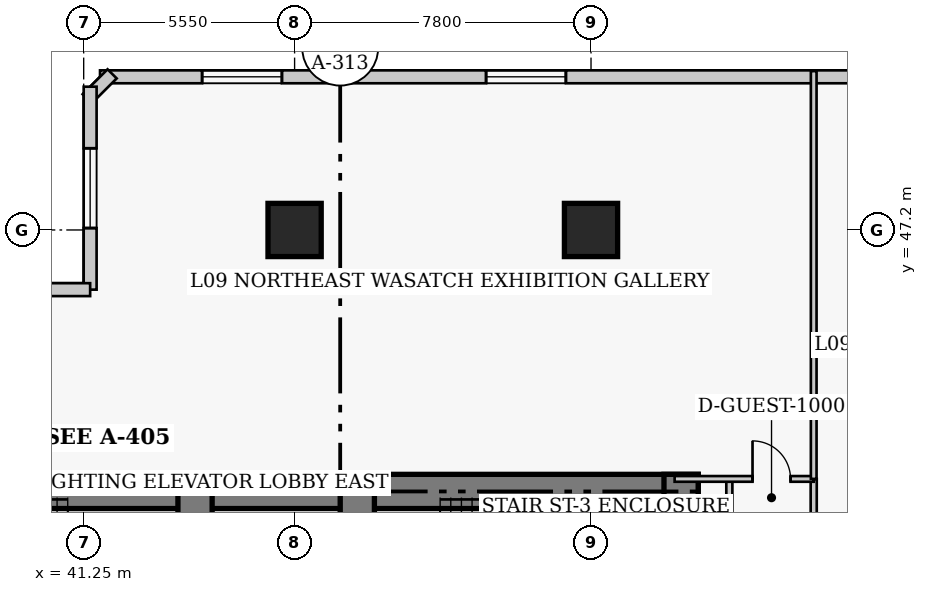
"""IFC4 building model, lengths in metres.
Left out: names, types, materials, properties, quantities, classifications, styles, units other than length and angle.
Written with IfcOpenShell. Run it as: python <this file> out.ifc"""

import sys

from ifc_helpers import new_model, si_unit, direction, frame, frame_2d, origin, origin_2d, place, context, subcontext, project, spatial, rectangle, extrude, element, fill, save


model = new_model("IFC4")
c1 = context("Model", 3, precision=1e-05, world=origin(), true_north=direction((0.0, 1.0)))
c2 = subcontext(c1, "Body", "Model", "MODEL_VIEW")
j1 = project(units=[si_unit("LENGTHUNIT", "METRE"), si_unit("PLANEANGLEUNIT", "RADIAN")], contexts=[c1])
p1 = place(None, origin())
s1 = spatial("IfcSite", under=j1, at=p1, CompositionType="ELEMENT")
p2 = place(p1, origin())
s2 = spatial("IfcBuilding", under=s1, at=p2, CompositionType="ELEMENT")
p3 = place(p2, frame((0.0, 0.0, 41.2)))
s3 = spatial("IfcBuildingStorey", under=s2, at=p3, CompositionType="ELEMENT", Elevation=41.2)
p4 = place(p3, frame((35.85, 40.32, 0.0), z_axis=(0.0, 0.0, 1.0), x_axis=(1.0, 0.0, 0.0)))
e1 = element("IfcWall", 1, at=p4, inside=s3, PredefinedType="SHEAR", context=c2, shape_type="SweptSolid", body=[
    extrude(rectangle(XDim=12.6, YDim=0.9, at=frame_2d((6.3, 0.0))), origin(), (0.0, 0.0, 1.0), 3.8),
])
p5 = place(p3, frame((48.45, 40.32, 0.0), z_axis=(0.0, 0.0, 1.0), x_axis=(1.0, 0.0, 0.0)))
e2 = element("IfcWall", 2, at=p5, inside=s3, PredefinedType="SHEAR", context=c2, shape_type="SweptSolid", body=[
    extrude(rectangle(XDim=8.97, YDim=0.9, at=frame_2d((4.485, 0.0))), origin(), (0.0, 0.0, 1.0), 3.8),
])
p6 = place(p3, frame((56.97, 27.05, 0.0), z_axis=(0.0, 0.0, 1.0), x_axis=(0.0, 1.0, 0.0)))
e3 = element("IfcWall", 3, at=p6, inside=s3, PredefinedType="SHEAR", context=c2, shape_type="SweptSolid", body=[
    extrude(rectangle(XDim=13.72, YDim=0.9, at=frame_2d((6.86, 0.0))), origin(), (0.0, 0.0, 1.0), 3.8),
])
p7 = place(p3, frame((44.18, 36.37, 0.0), z_axis=(0.0, 0.0, 1.0), x_axis=(0.0, 1.0, 0.0)))
e4 = element("IfcWall", 4, at=p7, inside=s3, PredefinedType="SHEAR", context=c2, shape_type="SweptSolid", body=[
    extrude(rectangle(XDim=3.95, YDim=0.9, at=frame_2d((1.975, 0.0))), origin(), (0.0, 0.0, 1.0), 3.8),
])
p8 = place(p3, frame((48.45, 32.3, 0.0), z_axis=(0.0, 0.0, 1.0), x_axis=(0.0, 1.0, 0.0)))
e5 = element("IfcWall", 5, at=p8, inside=s3, PredefinedType="SHEAR", context=c2, shape_type="SweptSolid", body=[
    extrude(rectangle(XDim=8.02, YDim=0.9, at=frame_2d((4.01, 0.0))), origin(), (0.0, 0.0, 1.0), 3.8),
])
p9 = place(p8, frame((5.9, 0.0, 0.0)))
e6 = element("IfcOpeningElement", 6, at=p9, cuts=e5, PredefinedType="OPENING", context=c2, shape_type="SweptSolid", body=[
    extrude(rectangle(XDim=1.1, YDim=2.15, at=frame_2d((0.55, 1.075))), frame((0.0, 0.46, 0.0), z_axis=(0.0, -1.0, 0.0), x_axis=(1.0, 0.0, 0.0)), (0.0, 0.0, 1.0), 0.92),
])
for number, where, z_axis, x_axis in (
    (7, (46.8, 47.2, 0.0), (0.0, 0.0, 1.0), (1.0, 0.0, 0.0)),
    (8, (54.6, 47.2, 0.0), (0.0, 0.0, 1.0), (1.0, 0.0, 0.0)),
):
    element("IfcColumn", number, at=place(p3, frame(where, z_axis=z_axis, x_axis=x_axis)), inside=s3, PredefinedType="COLUMN", context=c2, shape_type="SweptSolid", body=[
        extrude(rectangle(XDim=1.4, YDim=1.4, at=origin_2d()), origin(), (0.0, 0.0, 1.0), 3.8),
    ])
p10 = place(p3, frame((71.57, 51.23, 0.0), z_axis=(0.0, 0.0, 1.0), x_axis=(-1.0, 0.0, 0.0)))
e9 = element("IfcWall", 9, at=p10, inside=s3, PredefinedType="SOLIDWALL", context=c2, shape_type="SweptSolid", body=[
    extrude(rectangle(XDim=29.89, YDim=0.34, at=frame_2d((14.945, 0.0))), origin(), (0.0, 0.0, 1.0), 3.54),
])
p11 = place(p10, frame((2.686, 0.0, 0.85)))
e10 = element("IfcOpeningElement", 10, at=p11, cuts=e9, PredefinedType="OPENING", context=c2, shape_type="SweptSolid", body=[
    extrude(rectangle(XDim=2.1, YDim=1.85, at=frame_2d((1.05, 0.925))), frame((0.0, 0.18, 0.0), z_axis=(0.0, -1.0, 0.0), x_axis=(1.0, 0.0, 0.0)), (0.0, 0.0, 1.0), 0.36),
])
p12 = place(p10, frame((17.631, 0.0, 0.85)))
e11 = element("IfcOpeningElement", 11, at=p12, cuts=e9, PredefinedType="OPENING", context=c2, shape_type="SweptSolid", body=[
    extrude(rectangle(XDim=2.1, YDim=1.85, at=frame_2d((1.05, 0.925))), frame((0.0, 0.18, 0.0), z_axis=(0.0, -1.0, 0.0), x_axis=(1.0, 0.0, 0.0)), (0.0, 0.0, 1.0), 0.36),
])
p13 = place(p10, frame((25.104, 0.0, 0.85)))
e12 = element("IfcOpeningElement", 12, at=p13, cuts=e9, PredefinedType="OPENING", context=c2, shape_type="SweptSolid", body=[
    extrude(rectangle(XDim=2.1, YDim=1.85, at=frame_2d((1.05, 0.925))), frame((0.0, 0.18, 0.0), z_axis=(0.0, -1.0, 0.0), x_axis=(1.0, 0.0, 0.0)), (0.0, 0.0, 1.0), 0.36),
])
p14 = place(p3, frame((41.999, 51.308, 0.0), z_axis=(0.0, 0.0, 1.0), x_axis=(-0.707238225886, -0.706975312048, 0.0)))
e13 = element("IfcWall", 13, at=p14, inside=s3, PredefinedType="SOLIDWALL", context=c2, shape_type="SweptSolid", body=[
    extrude(rectangle(XDim=0.929, YDim=0.34, at=frame_2d((0.464, 0.0))), origin(), (0.0, 0.0, 1.0), 3.54),
])
p15 = place(p3, frame((41.42, 50.97, 0.0), z_axis=(0.0, 0.0, 1.0), x_axis=(0.0, -1.0, 0.0)))
e14 = element("IfcWall", 14, at=p15, inside=s3, PredefinedType="SOLIDWALL", context=c2, shape_type="SweptSolid", body=[
    extrude(rectangle(XDim=5.34, YDim=0.34, at=frame_2d((2.67, 0.0))), origin(), (0.0, 0.0, 1.0), 3.54),
])
p16 = place(p15, frame((1.62, 0.0, 0.85)))
e15 = element("IfcOpeningElement", 15, at=p16, cuts=e14, PredefinedType="OPENING", context=c2, shape_type="SweptSolid", body=[
    extrude(rectangle(XDim=2.1, YDim=1.85, at=frame_2d((1.05, 0.925))), frame((0.0, 0.18, 0.0), z_axis=(0.0, -1.0, 0.0), x_axis=(1.0, 0.0, 0.0)), (0.0, 0.0, 1.0), 0.36),
])
p17 = place(p3, frame((41.42, 45.63, 0.0), z_axis=(0.0, 0.0, 1.0), x_axis=(-1.0, 0.0, 0.0)))
e16 = element("IfcWall", 16, at=p17, inside=s3, PredefinedType="SOLIDWALL", context=c2, shape_type="SweptSolid", body=[
    extrude(rectangle(XDim=4.84, YDim=0.34, at=frame_2d((2.42, 0.0))), origin(), (0.0, 0.0, 1.0), 3.54),
])
p18 = place(p17, frame((1.37, 0.0, 0.85)))
e17 = element("IfcOpeningElement", 17, at=p18, cuts=e16, PredefinedType="OPENING", context=c2, shape_type="SweptSolid", body=[
    extrude(rectangle(XDim=2.1, YDim=1.85, at=frame_2d((1.05, 0.925))), frame((0.0, 0.18, 0.0), z_axis=(0.0, -1.0, 0.0), x_axis=(1.0, 0.0, 0.0)), (0.0, 0.0, 1.0), 0.36),
])
p19 = place(p3, frame((60.46, 10.25, 0.0), z_axis=(0.0, 0.0, 1.0), x_axis=(0.0, 1.0, 0.0)))
e18 = element("IfcWall", 18, at=p19, inside=s3, PredefinedType="PARTITIONING", context=c2, shape_type="SweptSolid", body=[
    extrude(rectangle(XDim=30.4, YDim=0.16, at=frame_2d((15.2, 0.0))), origin(), (0.0, 0.0, 1.0), 3.54),
])
p20 = place(p19, frame((4.4, 0.0, 0.0)))
e19 = element("IfcOpeningElement", 19, at=p20, cuts=e18, PredefinedType="OPENING", context=c2, shape_type="SweptSolid", body=[
    extrude(rectangle(XDim=0.95, YDim=2.1, at=frame_2d((0.475, 1.05))), frame((0.0, 0.09, 0.0), z_axis=(0.0, -1.0, 0.0), x_axis=(1.0, 0.0, 0.0)), (0.0, 0.0, 1.0), 0.18),
])
p21 = place(p19, frame((13.675, 0.0, 0.0)))
e20 = element("IfcOpeningElement", 20, at=p21, cuts=e18, PredefinedType="OPENING", context=c2, shape_type="SweptSolid", body=[
    extrude(rectangle(XDim=0.95, YDim=2.1, at=frame_2d((0.475, 1.05))), frame((0.0, 0.09, 0.0), z_axis=(0.0, -1.0, 0.0), x_axis=(1.0, 0.0, 0.0)), (0.0, 0.0, 1.0), 0.18),
])
p22 = place(p19, frame((21.475, 0.0, 0.0)))
e21 = element("IfcOpeningElement", 21, at=p22, cuts=e18, PredefinedType="OPENING", context=c2, shape_type="SweptSolid", body=[
    extrude(rectangle(XDim=0.95, YDim=2.1, at=frame_2d((0.475, 1.05))), frame((0.0, 0.09, 0.0), z_axis=(0.0, -1.0, 0.0), x_axis=(1.0, 0.0, 0.0)), (0.0, 0.0, 1.0), 0.18),
])
p23 = place(p19, frame((25.9, 0.0, 0.0)))
e22 = element("IfcOpeningElement", 22, at=p23, cuts=e18, PredefinedType="OPENING", context=c2, shape_type="SweptSolid", body=[
    extrude(rectangle(XDim=1.0, YDim=2.15, at=frame_2d((0.5, 1.075))), frame((0.0, 0.09, 0.0), z_axis=(0.0, -1.0, 0.0), x_axis=(1.0, 0.0, 0.0)), (0.0, 0.0, 1.0), 0.18),
])
p24 = place(p3, frame((58.24, 24.71, 0.0), z_axis=(0.0, 0.0, 1.0), x_axis=(0.0, 1.0, 0.0)))
e23 = element("IfcWall", 23, at=p24, inside=s3, PredefinedType="PARTITIONING", context=c2, shape_type="SweptSolid", body=[
    extrude(rectangle(XDim=15.94, YDim=0.16, at=frame_2d((7.97, 0.0))), origin(), (0.0, 0.0, 1.0), 3.54),
])
p25 = place(p3, frame((56.8, 40.65, 0.0), z_axis=(0.0, 0.0, 1.0), x_axis=(1.0, 0.0, 0.0)))
e24 = element("IfcWall", 24, at=p25, inside=s3, PredefinedType="PARTITIONING", context=c2, shape_type="SweptSolid", body=[
    extrude(rectangle(XDim=3.66, YDim=0.15, at=frame_2d((1.83, 0.0))), origin(), (0.0, 0.0, 1.0), 3.54),
])
p26 = place(p25, frame((2.05, 0.0, 0.0)))
e25 = element("IfcOpeningElement", 25, at=p26, cuts=e24, PredefinedType="OPENING", context=c2, shape_type="SweptSolid", body=[
    extrude(rectangle(XDim=1.0, YDim=2.15, at=frame_2d((0.5, 1.075))), frame((0.0, 0.085, 0.0), z_axis=(0.0, -1.0, 0.0), x_axis=(1.0, 0.0, 0.0)), (0.0, 0.0, 1.0), 0.17),
])
p27 = place(p3, frame((60.46, 40.65, 0.0), z_axis=(0.0, 0.0, 1.0), x_axis=(0.0, 1.0, 0.0)))
e26 = element("IfcWall", 26, at=p27, inside=s3, PredefinedType="PARTITIONING", context=c2, shape_type="SweptSolid", body=[
    extrude(rectangle(XDim=10.73, YDim=0.15, at=frame_2d((5.365, 0.0))), origin(), (0.0, 0.0, 1.0), 3.54),
])
p28 = place(p12, origin())
e27 = element("IfcWindow", 27, at=p28, inside=s3, PartitioningType="SINGLE_PANEL", PredefinedType="WINDOW", context=c2, shape_type="SweptSolid", body=[
    extrude(rectangle(XDim=2.1, YDim=1.85, at=frame_2d((1.05, 0.925))), frame((0.0, 0.03, 0.0), z_axis=(0.0, -1.0, 0.0), x_axis=(1.0, 0.0, 0.0)), (0.0, 0.0, 1.0), 0.06),
])
fill(e11, e27)
p29 = place(p13, origin())
e28 = element("IfcWindow", 28, at=p29, inside=s3, PartitioningType="SINGLE_PANEL", PredefinedType="WINDOW", context=c2, shape_type="SweptSolid", body=[
    extrude(rectangle(XDim=2.1, YDim=1.85, at=frame_2d((1.05, 0.925))), frame((0.0, 0.03, 0.0), z_axis=(0.0, -1.0, 0.0), x_axis=(1.0, 0.0, 0.0)), (0.0, 0.0, 1.0), 0.06),
])
fill(e12, e28)
p30 = place(p16, origin())
e29 = element("IfcWindow", 29, at=p30, inside=s3, PartitioningType="SINGLE_PANEL", PredefinedType="WINDOW", context=c2, shape_type="SweptSolid", body=[
    extrude(rectangle(XDim=2.1, YDim=1.85, at=frame_2d((1.05, 0.925))), frame((0.0, 0.03, 0.0), z_axis=(0.0, -1.0, 0.0), x_axis=(1.0, 0.0, 0.0)), (0.0, 0.0, 1.0), 0.06),
])
fill(e15, e29)
p31 = place(p26, origin())
e30 = element("IfcDoor", 30, at=p31, inside=s3, OperationType="SINGLE_SWING_LEFT", PredefinedType="DOOR", context=c2, shape_type="SweptSolid", body=[
    extrude(rectangle(XDim=1.0, YDim=2.15, at=frame_2d((0.5, 1.075))), frame((0.0, 0.025, 0.0), z_axis=(0.0, -1.0, 0.0), x_axis=(1.0, 0.0, 0.0)), (0.0, 0.0, 1.0), 0.05),
])
fill(e25, e30)
save(model, sys.argv[1])
